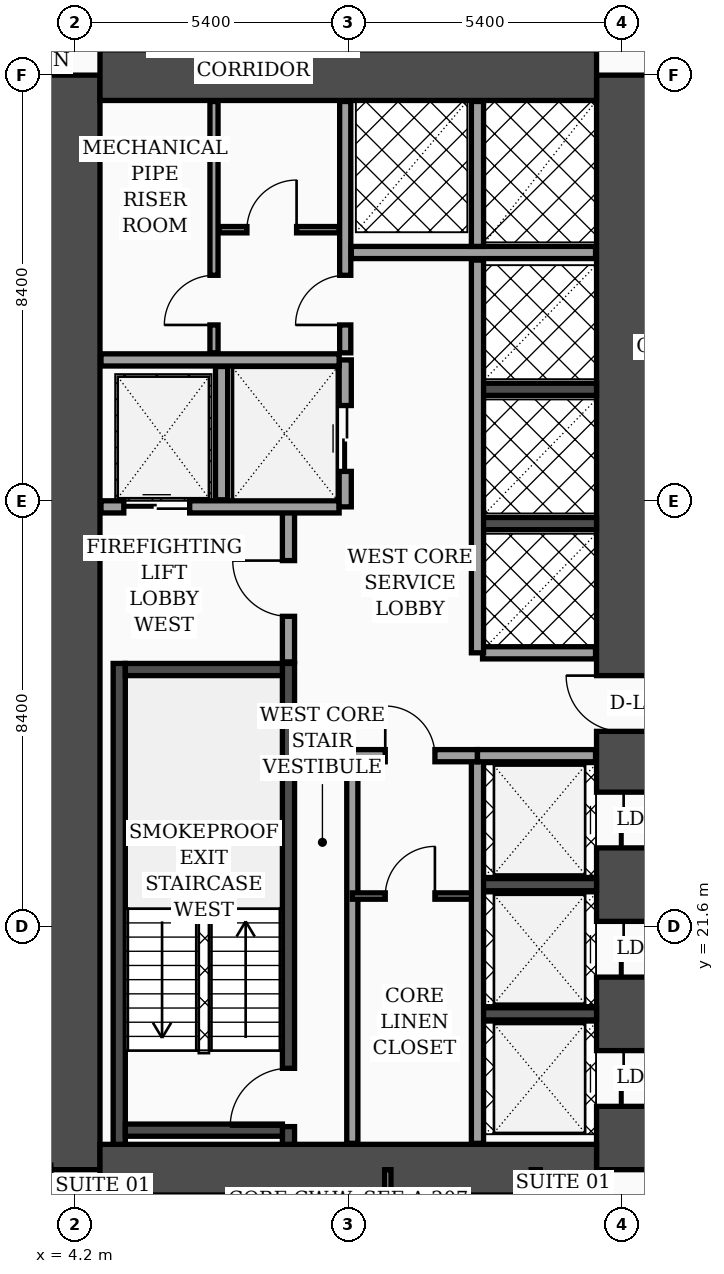
"""IFC4 building model, lengths in metres.
Left out: names, types, materials, properties, quantities, classifications, styles, units other than length and angle.
Written with IfcOpenShell. Run it as: python <this file> out.ifc"""

import sys

from ifc_helpers import new_model, si_unit, direction, frame, frame_2d, origin, place, context, subcontext, project, spatial, rectangle, extrude, element, fill, save


model = new_model("IFC4")
c1 = context("Model", 3, precision=1e-05, world=origin(), true_north=direction((0.0, 1.0)))
c2 = subcontext(c1, "Body", "Model", "MODEL_VIEW")
j1 = project(units=[si_unit("LENGTHUNIT", "METRE"), si_unit("PLANEANGLEUNIT", "RADIAN")], contexts=[c1])
p1 = place(None, origin())
s1 = spatial("IfcSite", under=j1, at=p1, CompositionType="ELEMENT")
p2 = place(p1, origin())
s2 = spatial("IfcBuilding", under=s1, at=p2, CompositionType="ELEMENT")
p3 = place(p2, frame((0.0, 0.0, 50.8)))
s3 = spatial("IfcBuildingStorey", under=s2, at=p3, CompositionType="ELEMENT", Elevation=50.8)
p4 = place(p3, frame((4.2, 16.8, 0.0), z_axis=(0.0, 0.0, 1.0), x_axis=(0.0, 1.0, 0.0)))
e1 = element("IfcWall", 1, at=p4, inside=s3, PredefinedType="SHEAR", context=c2, shape_type="SweptSolid", body=[
    extrude(rectangle(XDim=21.6, YDim=1.0, at=frame_2d((10.8, 0.0))), origin(), (0.0, 0.0, 1.0), 3.56),
])
p5 = place(p3, frame((15.0, 16.8, 0.0), z_axis=(0.0, 0.0, 1.0), x_axis=(0.0, 1.0, 0.0)))
e2 = element("IfcWall", 2, at=p5, inside=s3, PredefinedType="SHEAR", context=c2, shape_type="SweptSolid", body=[
    extrude(rectangle(XDim=21.6, YDim=1.0, at=frame_2d((10.8, 0.0))), origin(), (0.0, 0.0, 1.0), 3.56),
])
p6 = place(p5, frame((8.65, 0.0, 0.0)))
e3 = element("IfcOpeningElement", 3, at=p6, cuts=e2, PredefinedType="OPENING", context=c2, shape_type="SweptSolid", body=[
    extrude(rectangle(XDim=1.1, YDim=2.2, at=frame_2d((0.55, 1.1))), frame((0.0, 0.51, 0.0), z_axis=(0.0, -1.0, 0.0), x_axis=(1.0, 0.0, 0.0)), (0.0, 0.0, 1.0), 1.02),
])
p7 = place(p5, frame((1.25, 0.0, 0.0)))
e4 = element("IfcOpeningElement", 4, at=p7, cuts=e2, PredefinedType="OPENING", context=c2, shape_type="SweptSolid", body=[
    extrude(rectangle(XDim=1.1, YDim=2.2, at=frame_2d((0.55, 1.1))), frame((0.0, 0.51, 0.0), z_axis=(0.0, -1.0, 0.0), x_axis=(1.0, 0.0, 0.0)), (0.0, 0.0, 1.0), 1.02),
])
p8 = place(p5, frame((3.8, 0.0, 0.0)))
e5 = element("IfcOpeningElement", 5, at=p8, cuts=e2, PredefinedType="OPENING", context=c2, shape_type="SweptSolid", body=[
    extrude(rectangle(XDim=1.1, YDim=2.2, at=frame_2d((0.55, 1.1))), frame((0.0, 0.51, 0.0), z_axis=(0.0, -1.0, 0.0), x_axis=(1.0, 0.0, 0.0)), (0.0, 0.0, 1.0), 1.02),
])
p9 = place(p5, frame((6.35, 0.0, 0.0)))
e6 = element("IfcOpeningElement", 6, at=p9, cuts=e2, PredefinedType="OPENING", context=c2, shape_type="SweptSolid", body=[
    extrude(rectangle(XDim=1.1, YDim=2.2, at=frame_2d((0.55, 1.1))), frame((0.0, 0.51, 0.0), z_axis=(0.0, -1.0, 0.0), x_axis=(1.0, 0.0, 0.0)), (0.0, 0.0, 1.0), 1.02),
])
for number, where, z_axis, x_axis in (
    (7, (4.7, 38.4, 0.0), (0.0, 0.0, 1.0), (1.0, 0.0, 0.0)),
    (8, (4.7, 16.8, 0.0), (0.0, 0.0, 1.0), (1.0, 0.0, 0.0)),
):
    element("IfcWall", number, at=place(p3, frame(where, z_axis=z_axis, x_axis=x_axis)), inside=s3, PredefinedType="SHEAR", context=c2, shape_type="SweptSolid", body=[
        extrude(rectangle(XDim=9.8, YDim=1.0, at=frame_2d((4.9, 0.0))), origin(), (0.0, 0.0, 1.0), 3.56),
    ])
p10 = place(p3, frame((5.08, 17.3, 0.0), z_axis=(0.0, 0.0, 1.0), x_axis=(0.0, 1.0, 0.0)))
e9 = element("IfcWall", 9, at=p10, inside=s3, PredefinedType="SOLIDWALL", context=c2, shape_type="SweptSolid", body=[
    extrude(rectangle(XDim=9.49, YDim=0.24, at=frame_2d((4.745, 0.0))), origin(), (0.0, 0.0, 1.0), 3.56),
])
p11 = place(p3, frame((8.42, 17.3, 0.0), z_axis=(0.0, 0.0, 1.0), x_axis=(0.0, 1.0, 0.0)))
e10 = element("IfcWall", 10, at=p11, inside=s3, PredefinedType="SOLIDWALL", context=c2, shape_type="SweptSolid", body=[
    extrude(rectangle(XDim=9.49, YDim=0.24, at=frame_2d((4.745, 0.0))), origin(), (0.0, 0.0, 1.0), 3.56),
])
p12 = place(p11, frame((0.35, 0.0, 0.0)))
e11 = element("IfcOpeningElement", 11, at=p12, cuts=e10, PredefinedType="OPENING", context=c2, shape_type="SweptSolid", body=[
    extrude(rectangle(XDim=1.15, YDim=2.2, at=frame_2d((0.575, 1.1))), frame((0.0, 0.13, 0.0), z_axis=(0.0, -1.0, 0.0), x_axis=(1.0, 0.0, 0.0)), (0.0, 0.0, 1.0), 0.26),
])
for number, where, z_axis, x_axis in (
    (12, (5.2, 17.58, 0.0), (0.0, 0.0, 1.0), (1.0, 0.0, 0.0)),
    (13, (5.2, 26.67, 0.0), (0.0, 0.0, 1.0), (1.0, 0.0, 0.0)),
):
    element("IfcWall", number, at=place(p3, frame(where, z_axis=z_axis, x_axis=x_axis)), inside=s3, PredefinedType="SOLIDWALL", context=c2, shape_type="SweptSolid", body=[
        extrude(rectangle(XDim=3.1, YDim=0.24, at=frame_2d((1.55, 0.0))), origin(), (0.0, 0.0, 1.0), 3.56),
    ])
for number, where, z_axis, x_axis in (
    (14, (12.18, 19.875, 0.0), (0.0, 0.0, 1.0), (1.0, 0.0, 0.0)),
    (15, (12.18, 22.425, 0.0), (0.0, 0.0, 1.0), (1.0, 0.0, 0.0)),
    (16, (12.18, 29.55, 0.0), (0.0, 0.0, 1.0), (1.0, 0.0, 0.0)),
    (17, (12.18, 32.2, 0.0), (0.0, 0.0, 1.0), (1.0, 0.0, 0.0)),
):
    element("IfcWall", number, at=place(p3, frame(where, z_axis=z_axis, x_axis=x_axis)), inside=s3, PredefinedType="SOLIDWALL", context=c2, shape_type="SweptSolid", body=[
        extrude(rectangle(XDim=2.32, YDim=0.24, at=frame_2d((1.16, 0.0))), origin(), (0.0, 0.0, 1.0), 3.56),
    ])
p13 = place(p3, frame((8.42, 26.82, 0.0), z_axis=(0.0, 0.0, 1.0), x_axis=(0.0, 1.0, 0.0)))
e18 = element("IfcWall", 18, at=p13, inside=s3, PredefinedType="SOLIDWALL", context=c2, shape_type="SweptSolid", body=[
    extrude(rectangle(XDim=3.0, YDim=0.24, at=frame_2d((1.5, 0.0))), origin(), (0.0, 0.0, 1.0), 3.56),
])
p14 = place(p13, frame((0.9, 0.0, 0.0)))
e19 = element("IfcOpeningElement", 19, at=p14, cuts=e18, PredefinedType="OPENING", context=c2, shape_type="SweptSolid", body=[
    extrude(rectangle(XDim=1.1, YDim=2.2, at=frame_2d((0.55, 1.1))), frame((0.0, 0.13, 0.0), z_axis=(0.0, -1.0, 0.0), x_axis=(1.0, 0.0, 0.0)), (0.0, 0.0, 1.0), 0.26),
])
p15 = place(p3, frame((4.72, 29.88, 0.0), z_axis=(0.0, 0.0, 1.0), x_axis=(1.0, 0.0, 0.0)))
e20 = element("IfcWall", 20, at=p15, inside=s3, PredefinedType="SOLIDWALL", context=c2, shape_type="SweptSolid", body=[
    extrude(rectangle(XDim=4.7, YDim=0.24, at=frame_2d((2.35, 0.0))), origin(), (0.0, 0.0, 1.0), 3.56),
])
p16 = place(p15, frame((0.45, 0.0, 0.0)))
e21 = element("IfcOpeningElement", 21, at=p16, cuts=e20, PredefinedType="OPENING", context=c2, shape_type="SweptSolid", body=[
    extrude(rectangle(XDim=1.3, YDim=2.35, at=frame_2d((0.65, 1.175))), frame((0.0, 0.13, 0.0), z_axis=(0.0, -1.0, 0.0), x_axis=(1.0, 0.0, 0.0)), (0.0, 0.0, 1.0), 0.26),
])
p17 = place(p3, frame((7.1, 30.02, 0.0), z_axis=(0.0, 0.0, 1.0), x_axis=(0.0, 1.0, 0.0)))
e22 = element("IfcWall", 22, at=p17, inside=s3, PredefinedType="SOLIDWALL", context=c2, shape_type="SweptSolid", body=[
    extrude(rectangle(XDim=2.63, YDim=0.24, at=frame_2d((1.315, 0.0))), origin(), (0.0, 0.0, 1.0), 3.56),
])
p18 = place(p3, frame((9.54, 29.88, 0.0), z_axis=(0.0, 0.0, 1.0), x_axis=(0.0, 1.0, 0.0)))
e23 = element("IfcWall", 23, at=p18, inside=s3, PredefinedType="SOLIDWALL", context=c2, shape_type="SweptSolid", body=[
    extrude(rectangle(XDim=2.9, YDim=0.24, at=frame_2d((1.45, 0.0))), origin(), (0.0, 0.0, 1.0), 3.56),
])
p19 = place(p18, frame((0.7, 0.0, 0.0)))
e24 = element("IfcOpeningElement", 24, at=p19, cuts=e23, PredefinedType="OPENING", context=c2, shape_type="SweptSolid", body=[
    extrude(rectangle(XDim=1.3, YDim=2.35, at=frame_2d((0.65, 1.175))), frame((0.0, 0.13, 0.0), z_axis=(0.0, -1.0, 0.0), x_axis=(1.0, 0.0, 0.0)), (0.0, 0.0, 1.0), 0.26),
])
p20 = place(p3, frame((4.72, 32.78, 0.0), z_axis=(0.0, 0.0, 1.0), x_axis=(1.0, 0.0, 0.0)))
e25 = element("IfcWall", 25, at=p20, inside=s3, PredefinedType="SOLIDWALL", context=c2, shape_type="SweptSolid", body=[
    extrude(rectangle(XDim=4.7, YDim=0.24, at=frame_2d((2.35, 0.0))), origin(), (0.0, 0.0, 1.0), 3.56),
])
p21 = place(p3, frame((9.68, 17.32, 0.0), z_axis=(0.0, 0.0, 1.0), x_axis=(0.0, 1.0, 0.0)))
e26 = element("IfcWall", 26, at=p21, inside=s3, PredefinedType="SOLIDWALL", context=c2, shape_type="SweptSolid", body=[
    extrude(rectangle(XDim=7.68, YDim=0.22, at=frame_2d((3.84, 0.0))), origin(), (0.0, 0.0, 1.0), 3.56),
])
p22 = place(p3, frame((6.95, 32.92, 0.0), z_axis=(0.0, 0.0, 1.0), x_axis=(0.0, 1.0, 0.0)))
e27 = element("IfcWall", 27, at=p22, inside=s3, PredefinedType="PARTITIONING", context=c2, shape_type="SweptSolid", body=[
    extrude(rectangle(XDim=4.96, YDim=0.16, at=frame_2d((2.48, 0.0))), origin(), (0.0, 0.0, 1.0), 3.56),
])
p23 = place(p22, frame((0.55, 0.0, 0.0)))
e28 = element("IfcOpeningElement", 28, at=p23, cuts=e27, PredefinedType="OPENING", context=c2, shape_type="SweptSolid", body=[
    extrude(rectangle(XDim=0.98, YDim=2.15, at=frame_2d((0.49, 1.075))), frame((0.0, 0.09, 0.0), z_axis=(0.0, -1.0, 0.0), x_axis=(1.0, 0.0, 0.0)), (0.0, 0.0, 1.0), 0.18),
])
p24 = place(p3, frame((7.05, 35.35, 0.0), z_axis=(0.0, 0.0, 1.0), x_axis=(1.0, 0.0, 0.0)))
e29 = element("IfcWall", 29, at=p24, inside=s3, PredefinedType="PARTITIONING", context=c2, shape_type="SweptSolid", body=[
    extrude(rectangle(XDim=2.37, YDim=0.125, at=frame_2d((1.185, 0.0))), origin(), (0.0, 0.0, 1.0), 3.56),
])
p25 = place(p24, frame((0.55, 0.0, 0.0)))
e30 = element("IfcOpeningElement", 30, at=p25, cuts=e29, PredefinedType="OPENING", context=c2, shape_type="SweptSolid", body=[
    extrude(rectangle(XDim=0.98, YDim=2.15, at=frame_2d((0.49, 1.075))), frame((0.0, 0.073, 0.0), z_axis=(0.0, -1.0, 0.0), x_axis=(1.0, 0.0, 0.0)), (0.0, 0.0, 1.0), 0.145),
])
p26 = place(p3, frame((9.54, 32.92, 0.0), z_axis=(0.0, 0.0, 1.0), x_axis=(0.0, 1.0, 0.0)))
e31 = element("IfcWall", 31, at=p26, inside=s3, PredefinedType="SOLIDWALL", context=c2, shape_type="SweptSolid", body=[
    extrude(rectangle(XDim=4.96, YDim=0.22, at=frame_2d((2.48, 0.0))), origin(), (0.0, 0.0, 1.0), 3.56),
])
p27 = place(p26, frame((0.55, 0.0, 0.0)))
e32 = element("IfcOpeningElement", 32, at=p27, cuts=e31, PredefinedType="OPENING", context=c2, shape_type="SweptSolid", body=[
    extrude(rectangle(XDim=0.98, YDim=2.15, at=frame_2d((0.49, 1.075))), frame((0.0, 0.12, 0.0), z_axis=(0.0, -1.0, 0.0), x_axis=(1.0, 0.0, 0.0)), (0.0, 0.0, 1.0), 0.24),
])
p28 = place(p3, frame((9.68, 22.2, 0.0), z_axis=(0.0, 0.0, 1.0), x_axis=(1.0, 0.0, 0.0)))
e33 = element("IfcWall", 33, at=p28, inside=s3, PredefinedType="PARTITIONING", context=c2, shape_type="SweptSolid", body=[
    extrude(rectangle(XDim=2.47, YDim=0.125, at=frame_2d((1.235, 0.0))), origin(), (0.0, 0.0, 1.0), 3.56),
])
p29 = place(p28, frame((0.65, 0.0, 0.0)))
e34 = element("IfcOpeningElement", 34, at=p29, cuts=e33, PredefinedType="OPENING", context=c2, shape_type="SweptSolid", body=[
    extrude(rectangle(XDim=0.98, YDim=2.15, at=frame_2d((0.49, 1.075))), frame((0.0, 0.073, 0.0), z_axis=(0.0, -1.0, 0.0), x_axis=(1.0, 0.0, 0.0)), (0.0, 0.0, 1.0), 0.145),
])
p30 = place(p3, frame((12.15, 17.32, 0.0), z_axis=(0.0, 0.0, 1.0), x_axis=(0.0, 1.0, 0.0)))
e35 = element("IfcWall", 35, at=p30, inside=s3, PredefinedType="SOLIDWALL", context=c2, shape_type="SweptSolid", body=[
    extrude(rectangle(XDim=7.65, YDim=0.24, at=frame_2d((3.825, 0.0))), origin(), (0.0, 0.0, 1.0), 3.56),
])
p31 = place(p3, frame((9.68, 24.97, 0.0), z_axis=(0.0, 0.0, 1.0), x_axis=(1.0, 0.0, 0.0)))
e36 = element("IfcWall", 36, at=p31, inside=s3, PredefinedType="SOLIDWALL", context=c2, shape_type="SweptSolid", body=[
    extrude(rectangle(XDim=2.47, YDim=0.24, at=frame_2d((1.235, 0.0))), origin(), (0.0, 0.0, 1.0), 3.56),
])
p32 = place(p31, frame((0.65, 0.0, 0.0)))
e37 = element("IfcOpeningElement", 37, at=p32, cuts=e36, PredefinedType="OPENING", context=c2, shape_type="SweptSolid", body=[
    extrude(rectangle(XDim=0.98, YDim=2.15, at=frame_2d((0.49, 1.075))), frame((0.0, 0.13, 0.0), z_axis=(0.0, -1.0, 0.0), x_axis=(1.0, 0.0, 0.0)), (0.0, 0.0, 1.0), 0.26),
])
p33 = place(p3, frame((12.15, 24.97, 0.0), z_axis=(0.0, 0.0, 1.0), x_axis=(1.0, 0.0, 0.0)))
e38 = element("IfcWall", 38, at=p33, inside=s3, PredefinedType="SOLIDWALL", context=c2, shape_type="SweptSolid", body=[
    extrude(rectangle(XDim=2.33, YDim=0.24, at=frame_2d((1.165, 0.0))), origin(), (0.0, 0.0, 1.0), 2.84),
])
p34 = place(p3, frame((12.25, 27.0, 0.0), z_axis=(0.0, 0.0, 1.0), x_axis=(1.0, 0.0, 0.0)))
e39 = element("IfcWall", 39, at=p34, inside=s3, PredefinedType="SOLIDWALL", context=c2, shape_type="SweptSolid", body=[
    extrude(rectangle(XDim=2.23, YDim=0.24, at=frame_2d((1.115, 0.0))), origin(), (0.0, 0.0, 1.0), 3.56),
])
p35 = place(p3, frame((12.15, 27.0, 0.0), z_axis=(0.0, 0.0, 1.0), x_axis=(0.0, 1.0, 0.0)))
e40 = element("IfcWall", 40, at=p35, inside=s3, PredefinedType="SOLIDWALL", context=c2, shape_type="SweptSolid", body=[
    extrude(rectangle(XDim=7.75, YDim=0.24, at=frame_2d((3.875, 0.0))), origin(), (0.0, 0.0, 1.0), 3.56),
])
p36 = place(p3, frame((9.66, 34.9, 0.0), z_axis=(0.0, 0.0, 1.0), x_axis=(1.0, 0.0, 0.0)))
e41 = element("IfcWall", 41, at=p36, inside=s3, PredefinedType="SOLIDWALL", context=c2, shape_type="SweptSolid", body=[
    extrude(rectangle(XDim=4.82, YDim=0.24, at=frame_2d((2.41, 0.0))), origin(), (0.0, 0.0, 1.0), 3.56),
])
p37 = place(p3, frame((12.15, 35.02, 0.0), z_axis=(0.0, 0.0, 1.0), x_axis=(0.0, 1.0, 0.0)))
e42 = element("IfcWall", 42, at=p37, inside=s3, PredefinedType="SOLIDWALL", context=c2, shape_type="SweptSolid", body=[
    extrude(rectangle(XDim=2.86, YDim=0.24, at=frame_2d((1.43, 0.0))), origin(), (0.0, 0.0, 1.0), 3.56),
])
p38 = place(p3, frame((10.38, 14.55, 0.0), z_axis=(0.0, 0.0, 1.0), x_axis=(0.0, 1.0, 0.0)))
e43 = element("IfcWall", 43, at=p38, inside=s3, PredefinedType="PARTITIONING", context=c2, shape_type="SweptSolid", body=[
    extrude(rectangle(XDim=2.25, YDim=0.125, at=frame_2d((1.125, 0.0))), origin(), (0.0, 0.0, 1.0), 3.56),
])
p39 = place(p3, frame((13.3, 2.44, 0.0), z_axis=(0.0, 0.0, 1.0), x_axis=(0.0, 1.0, 0.0)))
e44 = element("IfcWall", 44, at=p39, inside=s3, PredefinedType="PARTITIONING", context=c2, shape_type="SweptSolid", body=[
    extrude(rectangle(XDim=14.36, YDim=0.18, at=frame_2d((7.18, 0.0))), origin(), (0.0, 0.0, 1.0), 3.04),
])
p40 = place(p39, frame((3.01, 0.0, 0.0)))
e45 = element("IfcOpeningElement", 45, at=p40, cuts=e44, PredefinedType="OPENING", context=c2, shape_type="SweptSolid", body=[
    extrude(rectangle(XDim=1.02, YDim=2.2, at=frame_2d((0.51, 1.1))), frame((0.0, 0.1, 0.0), z_axis=(0.0, -1.0, 0.0), x_axis=(1.0, 0.0, 0.0)), (0.0, 0.0, 1.0), 0.2),
])
p41 = place(p14, origin())
e46 = element("IfcDoor", 46, at=p41, inside=s3, OperationType="SINGLE_SWING_RIGHT", PredefinedType="DOOR", context=c2, shape_type="SweptSolid", body=[
    extrude(rectangle(XDim=1.1, YDim=2.2, at=frame_2d((0.55, 1.1))), frame((0.0, 0.025, 0.0), z_axis=(0.0, -1.0, 0.0), x_axis=(1.0, 0.0, 0.0)), (0.0, 0.0, 1.0), 0.05),
])
fill(e19, e46)
p42 = place(p16, origin())
e47 = element("IfcDoor", 47, at=p42, inside=s3, OperationType="DOUBLE_DOOR_SLIDING", PredefinedType="DOOR", context=c2, shape_type="SweptSolid", body=[
    extrude(rectangle(XDim=1.3, YDim=2.35, at=frame_2d((0.65, 1.175))), frame((0.0, 0.025, 0.0), z_axis=(0.0, -1.0, 0.0), x_axis=(1.0, 0.0, 0.0)), (0.0, 0.0, 1.0), 0.05),
])
fill(e21, e47)
p43 = place(p19, origin())
e48 = element("IfcDoor", 48, at=p43, inside=s3, OperationType="DOUBLE_DOOR_SLIDING", PredefinedType="DOOR", context=c2, shape_type="SweptSolid", body=[
    extrude(rectangle(XDim=1.3, YDim=2.35, at=frame_2d((0.65, 1.175))), frame((0.0, 0.025, 0.0), z_axis=(0.0, -1.0, 0.0), x_axis=(1.0, 0.0, 0.0)), (0.0, 0.0, 1.0), 0.05),
])
fill(e24, e48)
p44 = place(p23, origin())
e49 = element("IfcDoor", 49, at=p44, inside=s3, OperationType="SINGLE_SWING_LEFT", PredefinedType="DOOR", context=c2, shape_type="SweptSolid", body=[
    extrude(rectangle(XDim=0.98, YDim=2.15, at=frame_2d((0.49, 1.075))), frame((0.0, 0.025, 0.0), z_axis=(0.0, -1.0, 0.0), x_axis=(1.0, 0.0, 0.0)), (0.0, 0.0, 1.0), 0.05),
])
fill(e28, e49)
p45 = place(p25, origin())
e50 = element("IfcDoor", 50, at=p45, inside=s3, OperationType="SINGLE_SWING_RIGHT", PredefinedType="DOOR", context=c2, shape_type="SweptSolid", body=[
    extrude(rectangle(XDim=0.98, YDim=2.15, at=frame_2d((0.49, 1.075))), frame((0.0, 0.025, 0.0), z_axis=(0.0, -1.0, 0.0), x_axis=(1.0, 0.0, 0.0)), (0.0, 0.0, 1.0), 0.05),
])
fill(e30, e50)
p46 = place(p27, origin())
e51 = element("IfcDoor", 51, at=p46, inside=s3, OperationType="SINGLE_SWING_LEFT", PredefinedType="DOOR", context=c2, shape_type="SweptSolid", body=[
    extrude(rectangle(XDim=0.98, YDim=2.15, at=frame_2d((0.49, 1.075))), frame((0.0, 0.025, 0.0), z_axis=(0.0, -1.0, 0.0), x_axis=(1.0, 0.0, 0.0)), (0.0, 0.0, 1.0), 0.05),
])
fill(e32, e51)
p47 = place(p29, origin())
e52 = element("IfcDoor", 52, at=p47, inside=s3, OperationType="SINGLE_SWING_RIGHT", PredefinedType="DOOR", context=c2, shape_type="SweptSolid", body=[
    extrude(rectangle(XDim=0.98, YDim=2.15, at=frame_2d((0.49, 1.075))), frame((0.0, 0.025, 0.0), z_axis=(0.0, -1.0, 0.0), x_axis=(1.0, 0.0, 0.0)), (0.0, 0.0, 1.0), 0.05),
])
fill(e34, e52)
p48 = place(p32, origin())
e53 = element("IfcDoor", 53, at=p48, inside=s3, OperationType="SINGLE_SWING_LEFT", PredefinedType="DOOR", context=c2, shape_type="SweptSolid", body=[
    extrude(rectangle(XDim=0.98, YDim=2.15, at=frame_2d((0.49, 1.075))), frame((0.0, 0.025, 0.0), z_axis=(0.0, -1.0, 0.0), x_axis=(1.0, 0.0, 0.0)), (0.0, 0.0, 1.0), 0.05),
])
fill(e37, e53)
p49 = place(p12, origin())
e54 = element("IfcDoor", 54, at=p49, inside=s3, OperationType="SINGLE_SWING_LEFT", PredefinedType="DOOR", context=c2, shape_type="SweptSolid", body=[
    extrude(rectangle(XDim=1.15, YDim=2.2, at=frame_2d((0.575, 1.1))), frame((0.0, 0.025, 0.0), z_axis=(0.0, -1.0, 0.0), x_axis=(1.0, 0.0, 0.0)), (0.0, 0.0, 1.0), 0.05),
])
fill(e11, e54)
p50 = place(p6, origin())
e55 = element("IfcDoor", 55, at=p50, inside=s3, OperationType="SINGLE_SWING_RIGHT", PredefinedType="DOOR", context=c2, shape_type="SweptSolid", body=[
    extrude(rectangle(XDim=1.1, YDim=2.2, at=frame_2d((0.55, 1.1))), frame((0.0, 0.025, 0.0), z_axis=(0.0, -1.0, 0.0), x_axis=(1.0, 0.0, 0.0)), (0.0, 0.0, 1.0), 0.05),
])
fill(e3, e55)
p51 = place(p7, origin())
e56 = element("IfcDoor", 56, at=p51, inside=s3, OperationType="DOUBLE_DOOR_SLIDING", PredefinedType="DOOR", context=c2, shape_type="SweptSolid", body=[
    extrude(rectangle(XDim=1.1, YDim=2.2, at=frame_2d((0.55, 1.1))), frame((0.0, 0.025, 0.0), z_axis=(0.0, -1.0, 0.0), x_axis=(1.0, 0.0, 0.0)), (0.0, 0.0, 1.0), 0.05),
])
fill(e4, e56)
p52 = place(p8, origin())
e57 = element("IfcDoor", 57, at=p52, inside=s3, OperationType="DOUBLE_DOOR_SLIDING", PredefinedType="DOOR", context=c2, shape_type="SweptSolid", body=[
    extrude(rectangle(XDim=1.1, YDim=2.2, at=frame_2d((0.55, 1.1))), frame((0.0, 0.025, 0.0), z_axis=(0.0, -1.0, 0.0), x_axis=(1.0, 0.0, 0.0)), (0.0, 0.0, 1.0), 0.05),
])
fill(e5, e57)
p53 = place(p9, origin())
e58 = element("IfcDoor", 58, at=p53, inside=s3, OperationType="DOUBLE_DOOR_SLIDING", PredefinedType="DOOR", context=c2, shape_type="SweptSolid", body=[
    extrude(rectangle(XDim=1.1, YDim=2.2, at=frame_2d((0.55, 1.1))), frame((0.0, 0.025, 0.0), z_axis=(0.0, -1.0, 0.0), x_axis=(1.0, 0.0, 0.0)), (0.0, 0.0, 1.0), 0.05),
])
fill(e6, e58)
save(model, sys.argv[1])
